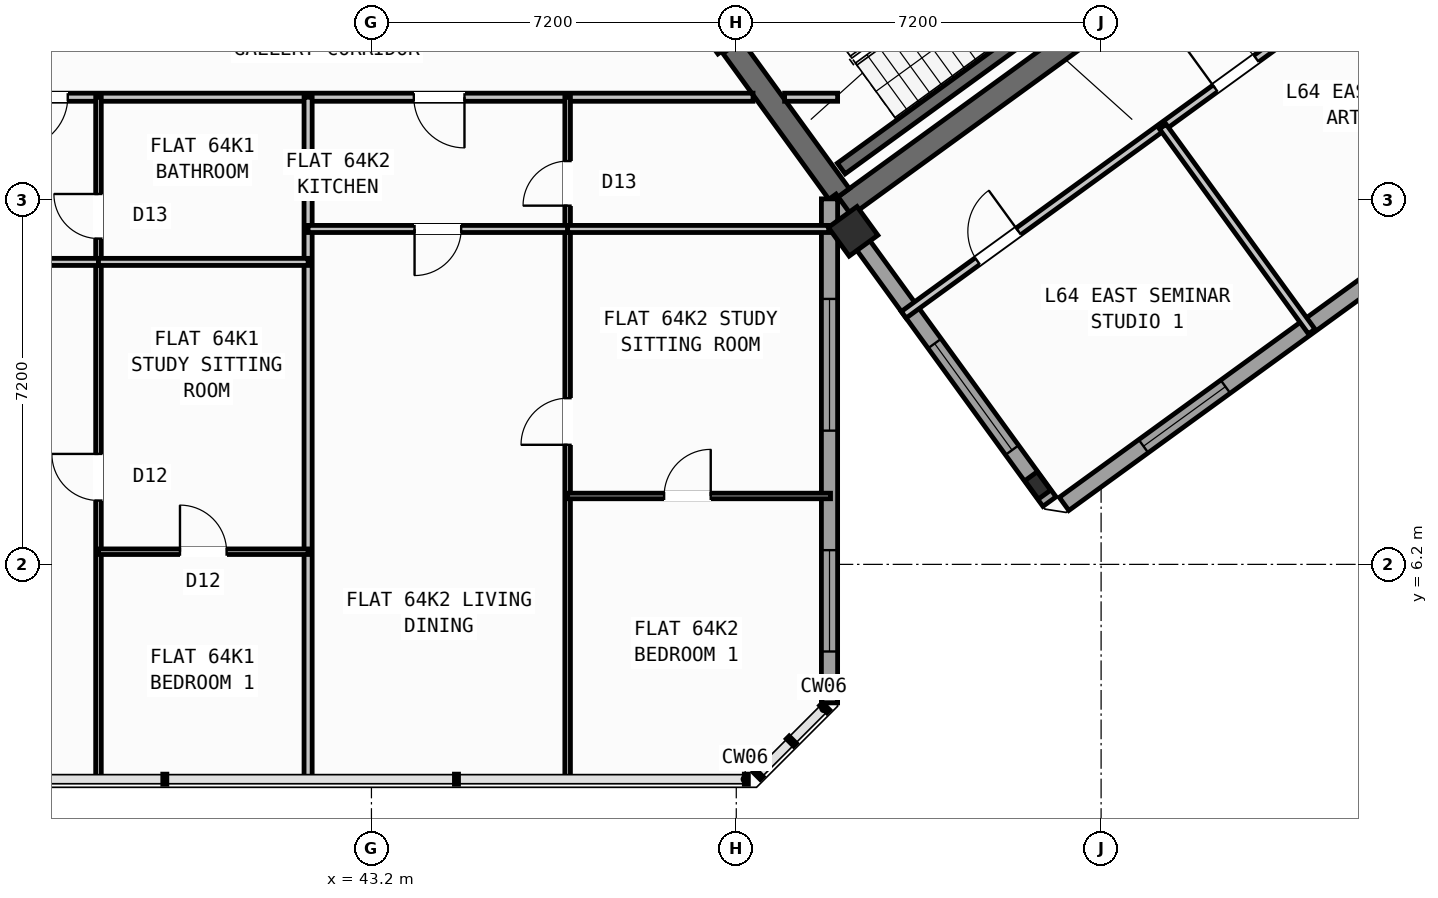
"""IFC4 building model, lengths in metres.
Left out: names, types, materials, properties, quantities, classifications, styles, units other than length and angle.
Written with IfcOpenShell. Run it as: python <this file> out.ifc"""

import sys

from ifc_helpers import new_model, si_unit, direction, frame, frame_2d, origin, origin_2d, place, context, subcontext, project, spatial, rectangle, hollow_rectangle, i_section, extrude, source, transform, mapped, element, fill, save


model = new_model("IFC4")
c1 = context("Model", 3, precision=1e-05, world=origin(), true_north=direction((0.0, 1.0)))
c2 = subcontext(c1, "Body", "Model", "MODEL_VIEW")
j1 = project(units=[si_unit("LENGTHUNIT", "METRE"), si_unit("PLANEANGLEUNIT", "RADIAN")], contexts=[c1])
p1 = place(None, origin())
s1 = spatial("IfcSite", under=j1, at=p1, CompositionType="ELEMENT")
p2 = place(p1, origin())
s2 = spatial("IfcBuilding", under=s1, at=p2, CompositionType="ELEMENT")
p3 = place(p2, frame((0.0, 0.0, 254.7)))
s3 = spatial("IfcBuildingStorey", under=s2, at=p3, CompositionType="ELEMENT", Elevation=254.7)
p4 = place(p3, frame((52.399, 13.169, 0.0), z_axis=(0.0, 0.0, 1.0), x_axis=(0.809022352778, 0.587777877013, 0.0)))
e1 = element("IfcWall", 1, at=p4, inside=s3, PredefinedType="SHEAR", context=c2, shape_type="SweptSolid", body=[
    extrude(rectangle(XDim=12.24, YDim=0.45, at=frame_2d((6.12, 0.0))), origin(), (0.0, 0.0, 1.0), 4.25),
])
p5 = place(p3, frame((52.449, 13.483, 0.0), z_axis=(0.0, 0.0, 1.0), x_axis=(-0.587819244441, 0.808992296542, 0.0)))
e2 = element("IfcWall", 2, at=p5, inside=s3, PredefinedType="SHEAR", context=c2, shape_type="SweptSolid", body=[
    extrude(rectangle(XDim=3.625, YDim=0.45, at=frame_2d((1.812, 0.0))), origin(), (0.0, 0.0, 1.0), 4.25),
])
m1 = source(origin(), c2, "Body", "SweptSolid", [
    extrude(i_section(OverallWidth=0.3, OverallDepth=0.45, WebThickness=0.014, FlangeThickness=0.026, at=origin_2d()), origin(), (0.0, 0.0, 1.0), 4.5),
])
p6 = place(p3, frame((56.35, 7.758, 0.0), z_axis=(0.0, 0.0, 1.0), x_axis=(0.809016994375, 0.587785252292, 0.0)))
e3 = element("IfcColumn", 3, at=p6, inside=s3, PredefinedType="COLUMN", context=c2, shape_type="MappedRepresentation", body=[
    mapped(m1, transform((0.0, 0.0, 0.0), scale=1.0)),
])
m2 = source(origin(), c2, "Body", "SweptSolid", [
    extrude(hollow_rectangle(XDim=0.7, YDim=0.7, WallThickness=0.028, at=origin_2d()), origin(), (0.0, 0.0, 1.0), 4.5),
])
p7 = place(p3, frame((52.705, 12.773, 0.0), z_axis=(0.0, 0.0, 1.0), x_axis=(0.809016994375, 0.587785252292, 0.0)))
e4 = element("IfcColumn", 4, at=p7, inside=s3, PredefinedType="COLUMN", context=c2, shape_type="MappedRepresentation", body=[
    mapped(m2, transform((0.0, 0.0, 0.0), scale=1.0)),
])
p8 = place(p3, frame((71.098, 17.731, 0.0), z_axis=(0.0, 0.0, 1.0), x_axis=(-0.809021120468, -0.587779573171, 0.0)))
e5 = element("IfcWall", 5, at=p8, inside=s3, PredefinedType="STANDARD", context=c2, shape_type="SweptSolid", body=[
    extrude(rectangle(XDim=17.588, YDim=0.32, at=frame_2d((8.794, 0.0))), origin(), (0.0, 0.0, 1.0), 4.25),
])
p9 = place(p8, frame((1.624, 0.0, 0.0)))
e6 = element("IfcOpeningElement", 6, at=p9, cuts=e5, PredefinedType="OPENING", context=c2, shape_type="SweptSolid", body=[
    extrude(rectangle(XDim=1.05, YDim=2.15, at=frame_2d((0.525, 1.075))), frame((0.0, 0.17, 0.0), z_axis=(0.0, -1.0, 0.0), x_axis=(1.0, 0.0, 0.0)), (0.0, 0.0, 1.0), 0.34),
])
p10 = place(p8, frame((6.159, 0.0, 0.7)))
e7 = element("IfcOpeningElement", 7, at=p10, cuts=e5, PredefinedType="OPENING", context=c2, shape_type="SweptSolid", body=[
    extrude(rectangle(XDim=2.6, YDim=2.0, at=frame_2d((1.3, 1.0))), frame((0.0, 0.17, 0.0), z_axis=(0.0, -1.0, 0.0), x_axis=(1.0, 0.0, 0.0)), (0.0, 0.0, 1.0), 0.34),
])
p11 = place(p8, frame((13.651, 0.0, 0.75)))
e8 = element("IfcOpeningElement", 8, at=p11, cuts=e5, PredefinedType="OPENING", context=c2, shape_type="SweptSolid", body=[
    extrude(rectangle(XDim=2.0, YDim=1.95, at=frame_2d((1.0, 0.975))), frame((0.0, 0.17, 0.0), z_axis=(0.0, -1.0, 0.0), x_axis=(1.0, 0.0, 0.0)), (0.0, 0.0, 1.0), 0.34),
])
p12 = place(p3, frame((56.581, 7.439, 0.0), z_axis=(0.0, 0.0, 1.0), x_axis=(-0.587776558368, 0.809023310809, 0.0)))
e9 = element("IfcWall", 9, at=p12, inside=s3, PredefinedType="STANDARD", context=c2, shape_type="SweptSolid", body=[
    extrude(rectangle(XDim=7.385, YDim=0.32, at=frame_2d((3.693, 0.0))), origin(), (0.0, 0.0, 1.0), 3.775),
])
p13 = place(p12, frame((1.256, 0.0, 0.7)))
e10 = element("IfcOpeningElement", 10, at=p13, cuts=e9, PredefinedType="OPENING", context=c2, shape_type="SweptSolid", body=[
    extrude(rectangle(XDim=2.6, YDim=2.0, at=frame_2d((1.3, 1.0))), frame((0.0, 0.17, 0.0), z_axis=(0.0, -1.0, 0.0), x_axis=(1.0, 0.0, 0.0)), (0.0, 0.0, 1.0), 0.34),
])
p14 = place(p3, frame((52.24, 13.414, 0.0), z_axis=(0.0, 0.0, 1.0), x_axis=(0.0, -1.0, 0.0)))
e11 = element("IfcWall", 11, at=p14, inside=s3, PredefinedType="STANDARD", context=c2, shape_type="SweptSolid", body=[
    extrude(rectangle(XDim=9.948, YDim=0.32, at=frame_2d((4.974, 0.0))), origin(), (0.0, 0.0, 1.0), 4.25),
])
p15 = place(p14, frame((1.975, 0.0, 0.7)))
e12 = element("IfcOpeningElement", 12, at=p15, cuts=e11, PredefinedType="OPENING", context=c2, shape_type="SweptSolid", body=[
    extrude(rectangle(XDim=2.6, YDim=2.0, at=frame_2d((1.3, 1.0))), frame((0.0, 0.17, 0.0), z_axis=(0.0, -1.0, 0.0), x_axis=(1.0, 0.0, 0.0)), (0.0, 0.0, 1.0), 0.34),
])
p16 = place(p14, frame((6.933, 0.0, 0.75)))
e13 = element("IfcOpeningElement", 13, at=p16, cuts=e11, PredefinedType="OPENING", context=c2, shape_type="SweptSolid", body=[
    extrude(rectangle(XDim=2.0, YDim=1.95, at=frame_2d((1.0, 0.975))), frame((0.0, 0.17, 0.0), z_axis=(0.0, -1.0, 0.0), x_axis=(1.0, 0.0, 0.0)), (0.0, 0.0, 1.0), 0.34),
])
p17 = place(p3, frame((52.472, 14.013, 0.0), z_axis=(0.0, 0.0, 1.0), x_axis=(0.809028366311, 0.587769599847, 0.0)))
e14 = element("IfcWall", 14, at=p17, inside=s3, PredefinedType="SHEAR", context=c2, shape_type="SweptSolid", body=[
    extrude(rectangle(XDim=7.33, YDim=0.26, at=frame_2d((3.665, 0.0))), origin(), (0.0, 0.0, 1.0), 4.25),
])
p18 = place(p3, frame((35.178, 15.42, 0.0), z_axis=(0.0, 0.0, 1.0), x_axis=(1.0, 0.0, 0.0)))
e15 = element("IfcWall", 15, at=p18, inside=s3, PredefinedType="PARTITIONING", context=c2, shape_type="SweptSolid", body=[
    extrude(rectangle(XDim=15.552, YDim=0.16, at=frame_2d((7.776, 0.0))), origin(), (0.0, 0.0, 1.0), 4.24),
])
p19 = place(p18, frame((1.028, 0.0, 0.0)))
e16 = element("IfcOpeningElement", 16, at=p19, cuts=e15, PredefinedType="OPENING", context=c2, shape_type="SweptSolid", body=[
    extrude(rectangle(XDim=1.0, YDim=2.1, at=frame_2d((0.5, 1.05))), frame((0.0, 0.09, 0.0), z_axis=(0.0, -1.0, 0.0), x_axis=(1.0, 0.0, 0.0)), (0.0, 0.0, 1.0), 0.18),
])
p20 = place(p18, frame((8.858, 0.0, 0.0)))
e17 = element("IfcOpeningElement", 17, at=p20, cuts=e15, PredefinedType="OPENING", context=c2, shape_type="SweptSolid", body=[
    extrude(rectangle(XDim=1.0, YDim=2.1, at=frame_2d((0.5, 1.05))), frame((0.0, 0.09, 0.0), z_axis=(0.0, -1.0, 0.0), x_axis=(1.0, 0.0, 0.0)), (0.0, 0.0, 1.0), 0.18),
])
p21 = place(p3, frame((51.354, 15.42, 0.0), z_axis=(0.0, 0.0, 1.0), x_axis=(1.0, 0.0, 0.0)))
e18 = element("IfcWall", 18, at=p21, inside=s3, PredefinedType="PARTITIONING", context=c2, shape_type="SweptSolid", body=[
    extrude(rectangle(XDim=1.046, YDim=0.16, at=frame_2d((0.523, 0.0))), origin(), (0.0, 0.0, 1.0), 4.24),
])
p22 = place(p3, frame((50.119, 16.333, 0.0), z_axis=(0.0, 0.0, 1.0), x_axis=(-0.587749856981, 0.809042709391, 0.0)))
e19 = element("IfcWall", 19, at=p22, inside=s3, PredefinedType="STANDARD", context=c2, shape_type="SweptSolid", body=[
    extrude(rectangle(XDim=2.96, YDim=0.2, at=frame_2d((1.48, 0.0))), origin(), (0.0, 0.0, 1.0), 4.24),
])
p23 = place(p22, frame((0.53, 0.0, 0.0)))
e20 = element("IfcOpeningElement", 20, at=p23, cuts=e19, PredefinedType="OPENING", context=c2, shape_type="SweptSolid", body=[
    extrude(rectangle(XDim=1.5, YDim=2.15, at=frame_2d((0.75, 1.075))), frame((0.0, 0.11, 0.0), z_axis=(0.0, -1.0, 0.0), x_axis=(1.0, 0.0, 0.0)), (0.0, 0.0, 1.0), 0.22),
])
p24 = place(p3, frame((41.95, 1.96, 0.0), z_axis=(0.0, 0.0, 1.0), x_axis=(0.0, 1.0, 0.0)))
e21 = element("IfcWall", 21, at=p24, inside=s3, PredefinedType="PARTITIONING", context=c2, shape_type="SweptSolid", body=[
    extrude(rectangle(XDim=13.46, YDim=0.16, at=frame_2d((6.73, 0.0))), origin(), (0.0, 0.0, 1.0), 4.24),
])
p25 = place(p3, frame((37.813, 1.96, 0.0), z_axis=(0.0, 0.0, 1.0), x_axis=(0.0, 1.0, 0.0)))
e22 = element("IfcWall", 22, at=p25, inside=s3, PredefinedType="PARTITIONING", context=c2, shape_type="SweptSolid", body=[
    extrude(rectangle(XDim=13.46, YDim=0.11, at=frame_2d((6.73, 0.0))), origin(), (0.0, 0.0, 1.0), 4.24),
])
p26 = place(p25, frame((5.5, 0.0, 0.0)))
e23 = element("IfcOpeningElement", 23, at=p26, cuts=e22, PredefinedType="OPENING", context=c2, shape_type="SweptSolid", body=[
    extrude(rectangle(XDim=0.92, YDim=2.08, at=frame_2d((0.46, 1.04))), frame((0.0, 0.065, 0.0), z_axis=(0.0, -1.0, 0.0), x_axis=(1.0, 0.0, 0.0)), (0.0, 0.0, 1.0), 0.13),
])
p27 = place(p25, frame((10.67, 0.0, 0.0)))
e24 = element("IfcOpeningElement", 24, at=p27, cuts=e22, PredefinedType="OPENING", context=c2, shape_type="SweptSolid", body=[
    extrude(rectangle(XDim=0.88, YDim=2.08, at=frame_2d((0.44, 1.04))), frame((0.0, 0.065, 0.0), z_axis=(0.0, -1.0, 0.0), x_axis=(1.0, 0.0, 0.0)), (0.0, 0.0, 1.0), 0.13),
])
p28 = place(p3, frame((33.525, 12.17, 0.0), z_axis=(0.0, 0.0, 1.0), x_axis=(1.0, 0.0, 0.0)))
e25 = element("IfcWall", 25, at=p28, inside=s3, PredefinedType="PLUMBINGWALL", context=c2, shape_type="SweptSolid", body=[
    extrude(rectangle(XDim=4.288, YDim=0.14, at=frame_2d((2.144, 0.0))), origin(), (0.0, 0.0, 1.0), 3.425),
])
p29 = place(p28, frame((0.972, 0.0, 0.0)))
e26 = element("IfcOpeningElement", 26, at=p29, cuts=e25, PredefinedType="OPENING", context=c2, shape_type="SweptSolid", body=[
    extrude(rectangle(XDim=0.92, YDim=2.08, at=frame_2d((0.46, 1.04))), frame((0.0, 0.08, 0.0), z_axis=(0.0, -1.0, 0.0), x_axis=(1.0, 0.0, 0.0)), (0.0, 0.0, 1.0), 0.16),
])
p30 = place(p3, frame((37.813, 12.17, 0.0), z_axis=(0.0, 0.0, 1.0), x_axis=(1.0, 0.0, 0.0)))
e27 = element("IfcWall", 27, at=p30, inside=s3, PredefinedType="PLUMBINGWALL", context=c2, shape_type="SweptSolid", body=[
    extrude(rectangle(XDim=4.137, YDim=0.14, at=frame_2d((2.068, 0.0))), origin(), (0.0, 0.0, 1.0), 3.425),
])
p31 = place(p3, frame((37.813, 6.45, 0.0), z_axis=(0.0, 0.0, 1.0), x_axis=(1.0, 0.0, 0.0)))
e28 = element("IfcWall", 28, at=p31, inside=s3, PredefinedType="PARTITIONING", context=c2, shape_type="SweptSolid", body=[
    extrude(rectangle(XDim=4.137, YDim=0.11, at=frame_2d((2.068, 0.0))), origin(), (0.0, 0.0, 1.0), 4.24),
])
p32 = place(p31, frame((1.608, 0.0, 0.0)))
e29 = element("IfcOpeningElement", 29, at=p32, cuts=e28, PredefinedType="OPENING", context=c2, shape_type="SweptSolid", body=[
    extrude(rectangle(XDim=0.92, YDim=2.08, at=frame_2d((0.46, 1.04))), frame((0.0, 0.065, 0.0), z_axis=(0.0, -1.0, 0.0), x_axis=(1.0, 0.0, 0.0)), (0.0, 0.0, 1.0), 0.13),
])
p33 = place(p3, frame((47.072, 1.96, 0.0), z_axis=(0.0, 0.0, 1.0), x_axis=(0.0, 1.0, 0.0)))
e30 = element("IfcWall", 30, at=p33, inside=s3, PredefinedType="PARTITIONING", context=c2, shape_type="SweptSolid", body=[
    extrude(rectangle(XDim=13.46, YDim=0.11, at=frame_2d((6.73, 0.0))), origin(), (0.0, 0.0, 1.0), 4.24),
])
p34 = place(p33, frame((6.6, 0.0, 0.0)))
e31 = element("IfcOpeningElement", 31, at=p34, cuts=e30, PredefinedType="OPENING", context=c2, shape_type="SweptSolid", body=[
    extrude(rectangle(XDim=0.92, YDim=2.08, at=frame_2d((0.46, 1.04))), frame((0.0, 0.065, 0.0), z_axis=(0.0, -1.0, 0.0), x_axis=(1.0, 0.0, 0.0)), (0.0, 0.0, 1.0), 0.13),
])
p35 = place(p33, frame((11.32, 0.0, 0.0)))
e32 = element("IfcOpeningElement", 32, at=p35, cuts=e30, PredefinedType="OPENING", context=c2, shape_type="SweptSolid", body=[
    extrude(rectangle(XDim=0.88, YDim=2.08, at=frame_2d((0.44, 1.04))), frame((0.0, 0.065, 0.0), z_axis=(0.0, -1.0, 0.0), x_axis=(1.0, 0.0, 0.0)), (0.0, 0.0, 1.0), 0.13),
])
p36 = place(p3, frame((41.95, 12.82, 0.0), z_axis=(0.0, 0.0, 1.0), x_axis=(1.0, 0.0, 0.0)))
e33 = element("IfcWall", 33, at=p36, inside=s3, PredefinedType="PLUMBINGWALL", context=c2, shape_type="SweptSolid", body=[
    extrude(rectangle(XDim=5.122, YDim=0.14, at=frame_2d((2.561, 0.0))), origin(), (0.0, 0.0, 1.0), 3.425),
])
p37 = place(p36, frame((2.101, 0.0, 0.0)))
e34 = element("IfcOpeningElement", 34, at=p37, cuts=e33, PredefinedType="OPENING", context=c2, shape_type="SweptSolid", body=[
    extrude(rectangle(XDim=0.92, YDim=2.08, at=frame_2d((0.46, 1.04))), frame((0.0, 0.08, 0.0), z_axis=(0.0, -1.0, 0.0), x_axis=(1.0, 0.0, 0.0)), (0.0, 0.0, 1.0), 0.16),
])
p38 = place(p3, frame((47.072, 12.82, 0.0), z_axis=(0.0, 0.0, 1.0), x_axis=(1.0, 0.0, 0.0)))
e35 = element("IfcWall", 35, at=p38, inside=s3, PredefinedType="PLUMBINGWALL", context=c2, shape_type="SweptSolid", body=[
    extrude(rectangle(XDim=5.152, YDim=0.14, at=frame_2d((2.576, 0.0))), origin(), (0.0, 0.0, 1.0), 3.425),
])
p39 = place(p3, frame((47.072, 7.55, 0.0), z_axis=(0.0, 0.0, 1.0), x_axis=(1.0, 0.0, 0.0)))
e36 = element("IfcWall", 36, at=p39, inside=s3, PredefinedType="PARTITIONING", context=c2, shape_type="SweptSolid", body=[
    extrude(rectangle(XDim=5.188, YDim=0.11, at=frame_2d((2.594, 0.0))), origin(), (0.0, 0.0, 1.0), 4.24),
])
p40 = place(p39, frame((1.904, 0.0, 0.0)))
e37 = element("IfcOpeningElement", 37, at=p40, cuts=e36, PredefinedType="OPENING", context=c2, shape_type="SweptSolid", body=[
    extrude(rectangle(XDim=0.92, YDim=2.08, at=frame_2d((0.46, 1.04))), frame((0.0, 0.065, 0.0), z_axis=(0.0, -1.0, 0.0), x_axis=(1.0, 0.0, 0.0)), (0.0, 0.0, 1.0), 0.13),
])
p41 = place(p3, frame((68.353, 15.922, 0.0), z_axis=(0.0, 0.0, 1.0), x_axis=(-0.587783631512, 0.809018171939, 0.0)))
e38 = element("IfcWall", 38, at=p41, inside=s3, PredefinedType="PARTITIONING", context=c2, shape_type="SweptSolid", body=[
    extrude(rectangle(XDim=21.7, YDim=0.16, at=frame_2d((10.85, 0.0))), origin(), (0.0, 0.0, 1.0), 4.24),
])
p42 = place(p41, frame((5.0, 0.0, 0.0)))
e39 = element("IfcOpeningElement", 39, at=p42, cuts=e38, PredefinedType="OPENING", context=c2, shape_type="SweptSolid", body=[
    extrude(rectangle(XDim=1.7, YDim=2.2, at=frame_2d((0.85, 1.1))), frame((0.0, 0.09, 0.0), z_axis=(0.0, -1.0, 0.0), x_axis=(1.0, 0.0, 0.0)), (0.0, 0.0, 1.0), 0.18),
])
p43 = place(p3, frame((53.705, 11.126, 0.0), z_axis=(0.0, 0.0, 1.0), x_axis=(0.809014504436, 0.587788679384, 0.0)))
e40 = element("IfcWall", 40, at=p43, inside=s3, PredefinedType="PARTITIONING", context=c2, shape_type="SweptSolid", body=[
    extrude(rectangle(XDim=14.67, YDim=0.16, at=frame_2d((7.335, 0.0))), origin(), (0.0, 0.0, 1.0), 4.24),
])
p44 = place(p43, frame((1.8, 0.0, 0.0)))
e41 = element("IfcOpeningElement", 41, at=p44, cuts=e40, PredefinedType="OPENING", context=c2, shape_type="SweptSolid", body=[
    extrude(rectangle(XDim=1.0, YDim=2.1, at=frame_2d((0.5, 1.05))), frame((0.0, 0.09, 0.0), z_axis=(0.0, -1.0, 0.0), x_axis=(1.0, 0.0, 0.0)), (0.0, 0.0, 1.0), 0.18),
])
p45 = place(p43, frame((7.6, 0.0, 0.0)))
e42 = element("IfcOpeningElement", 42, at=p45, cuts=e40, PredefinedType="OPENING", context=c2, shape_type="SweptSolid", body=[
    extrude(rectangle(XDim=1.0, YDim=2.1, at=frame_2d((0.5, 1.05))), frame((0.0, 0.09, 0.0), z_axis=(0.0, -1.0, 0.0), x_axis=(1.0, 0.0, 0.0)), (0.0, 0.0, 1.0), 0.18),
])
p46 = place(p3, frame((61.756, 10.796, 0.0), z_axis=(0.0, 0.0, 1.0), x_axis=(-0.587782595105, 0.809018924928, 0.0)))
e43 = element("IfcWall", 43, at=p46, inside=s3, PredefinedType="PARTITIONING", context=c2, shape_type="SweptSolid", body=[
    extrude(rectangle(XDim=5.0, YDim=0.16, at=frame_2d((2.5, 0.0))), origin(), (0.0, 0.0, 1.0), 4.24),
])
m3 = source(origin(), c2, "Body", "SweptSolid", [
    extrude(rectangle(XDim=2.0, YDim=1.95, at=frame_2d((1.0, 0.975))), frame((0.0, 0.03, 0.0), z_axis=(0.0, -1.0, 0.0), x_axis=(1.0, 0.0, 0.0)), (0.0, 0.0, 1.0), 0.06),
])
p47 = place(p11, origin())
e44 = element("IfcWindow", 44, at=p47, inside=s3, PartitioningType="SINGLE_PANEL", PredefinedType="WINDOW", context=c2, shape_type="MappedRepresentation", body=[
    mapped(m3, transform((0.0, 0.0, 0.0), scale=1.0)),
])
fill(e8, e44)
m4 = source(origin(), c2, "Body", "SweptSolid", [
    extrude(rectangle(XDim=2.6, YDim=2.0, at=frame_2d((1.3, 1.0))), frame((0.0, 0.03, 0.0), z_axis=(0.0, -1.0, 0.0), x_axis=(1.0, 0.0, 0.0)), (0.0, 0.0, 1.0), 0.06),
])
p48 = place(p13, origin())
e45 = element("IfcWindow", 45, at=p48, inside=s3, PartitioningType="SINGLE_PANEL", PredefinedType="WINDOW", context=c2, shape_type="MappedRepresentation", body=[
    mapped(m4, transform((0.0, 0.0, 0.0), scale=1.0)),
])
fill(e10, e45)
p49 = place(p15, origin())
e46 = element("IfcWindow", 46, at=p49, inside=s3, PartitioningType="SINGLE_PANEL", PredefinedType="WINDOW", context=c2, shape_type="MappedRepresentation", body=[
    mapped(m4, transform((0.0, 0.0, 0.0), scale=1.0)),
])
fill(e12, e46)
p50 = place(p16, origin())
e47 = element("IfcWindow", 47, at=p50, inside=s3, PartitioningType="SINGLE_PANEL", PredefinedType="WINDOW", context=c2, shape_type="MappedRepresentation", body=[
    mapped(m3, transform((0.0, 0.0, 0.0), scale=1.0)),
])
fill(e13, e47)
m5 = source(origin(), c2, "Body", "SweptSolid", [
    extrude(rectangle(XDim=0.92, YDim=2.08, at=frame_2d((0.46, 1.04))), frame((0.0, 0.025, 0.0), z_axis=(0.0, -1.0, 0.0), x_axis=(1.0, 0.0, 0.0)), (0.0, 0.0, 1.0), 0.05),
])
p51 = place(p26, origin())
e48 = element("IfcDoor", 48, at=p51, inside=s3, OperationType="SINGLE_SWING_RIGHT", PredefinedType="DOOR", context=c2, shape_type="MappedRepresentation", body=[
    mapped(m5, transform((0.0, 0.0, 0.0), scale=1.0)),
])
fill(e23, e48)
p52 = place(p32, origin())
e49 = element("IfcDoor", 49, at=p52, inside=s3, OperationType="SINGLE_SWING_LEFT", PredefinedType="DOOR", context=c2, shape_type="MappedRepresentation", body=[
    mapped(m5, transform((0.0, 0.0, 0.0), scale=1.0)),
])
fill(e29, e49)
m6 = source(origin(), c2, "Body", "SweptSolid", [
    extrude(rectangle(XDim=1.0, YDim=2.1, at=frame_2d((0.5, 1.05))), frame((0.0, 0.025, 0.0), z_axis=(0.0, -1.0, 0.0), x_axis=(1.0, 0.0, 0.0)), (0.0, 0.0, 1.0), 0.05),
])
p53 = place(p19, frame((1.0, 0.0, 0.0), z_axis=(0.0, 0.0, 1.0), x_axis=(-1.0, 0.0, 0.0)))
e50 = element("IfcDoor", 50, at=p53, inside=s3, OperationType="SINGLE_SWING_RIGHT", PredefinedType="DOOR", context=c2, shape_type="MappedRepresentation", body=[
    mapped(m6, transform((0.0, 0.0, 0.0), scale=1.0)),
])
fill(e16, e50)
m7 = source(origin(), c2, "Body", "SweptSolid", [
    extrude(rectangle(XDim=0.88, YDim=2.08, at=frame_2d((0.44, 1.04))), frame((0.0, 0.025, 0.0), z_axis=(0.0, -1.0, 0.0), x_axis=(1.0, 0.0, 0.0)), (0.0, 0.0, 1.0), 0.05),
])
p54 = place(p27, origin())
e51 = element("IfcDoor", 51, at=p54, inside=s3, OperationType="SINGLE_SWING_RIGHT", PredefinedType="DOOR", context=c2, shape_type="MappedRepresentation", body=[
    mapped(m7, transform((0.0, 0.0, 0.0), scale=1.0)),
])
fill(e24, e51)
p55 = place(p34, origin())
e52 = element("IfcDoor", 52, at=p55, inside=s3, OperationType="SINGLE_SWING_LEFT", PredefinedType="DOOR", context=c2, shape_type="MappedRepresentation", body=[
    mapped(m5, transform((0.0, 0.0, 0.0), scale=1.0)),
])
fill(e31, e52)
p56 = place(p40, origin())
e53 = element("IfcDoor", 53, at=p56, inside=s3, OperationType="SINGLE_SWING_RIGHT", PredefinedType="DOOR", context=c2, shape_type="MappedRepresentation", body=[
    mapped(m5, transform((0.0, 0.0, 0.0), scale=1.0)),
])
fill(e37, e53)
p57 = place(p20, frame((1.0, 0.0, 0.0), z_axis=(0.0, 0.0, 1.0), x_axis=(-1.0, 0.0, 0.0)))
e54 = element("IfcDoor", 54, at=p57, inside=s3, OperationType="SINGLE_SWING_LEFT", PredefinedType="DOOR", context=c2, shape_type="MappedRepresentation", body=[
    mapped(m6, transform((0.0, 0.0, 0.0), scale=1.0)),
])
fill(e17, e54)
p58 = place(p37, frame((0.92, 0.0, 0.0), z_axis=(0.0, 0.0, 1.0), x_axis=(-1.0, 0.0, 0.0)))
e55 = element("IfcDoor", 55, at=p58, inside=s3, OperationType="SINGLE_SWING_RIGHT", PredefinedType="DOOR", context=c2, shape_type="MappedRepresentation", body=[
    mapped(m5, transform((0.0, 0.0, 0.0), scale=1.0)),
])
fill(e34, e55)
p59 = place(p35, origin())
e56 = element("IfcDoor", 56, at=p59, inside=s3, OperationType="SINGLE_SWING_LEFT", PredefinedType="DOOR", context=c2, shape_type="MappedRepresentation", body=[
    mapped(m7, transform((0.0, 0.0, 0.0), scale=1.0)),
])
fill(e32, e56)
p60 = place(p44, origin())
e57 = element("IfcDoor", 57, at=p60, inside=s3, OperationType="SINGLE_SWING_RIGHT", PredefinedType="DOOR", context=c2, shape_type="MappedRepresentation", body=[
    mapped(m6, transform((0.0, 0.0, 0.0), scale=1.0)),
])
fill(e41, e57)
p61 = place(p45, origin())
e58 = element("IfcDoor", 58, at=p61, inside=s3, OperationType="SINGLE_SWING_LEFT", PredefinedType="DOOR", context=c2, shape_type="MappedRepresentation", body=[
    mapped(m6, transform((0.0, 0.0, 0.0), scale=1.0)),
])
fill(e42, e58)
save(model, sys.argv[1])
